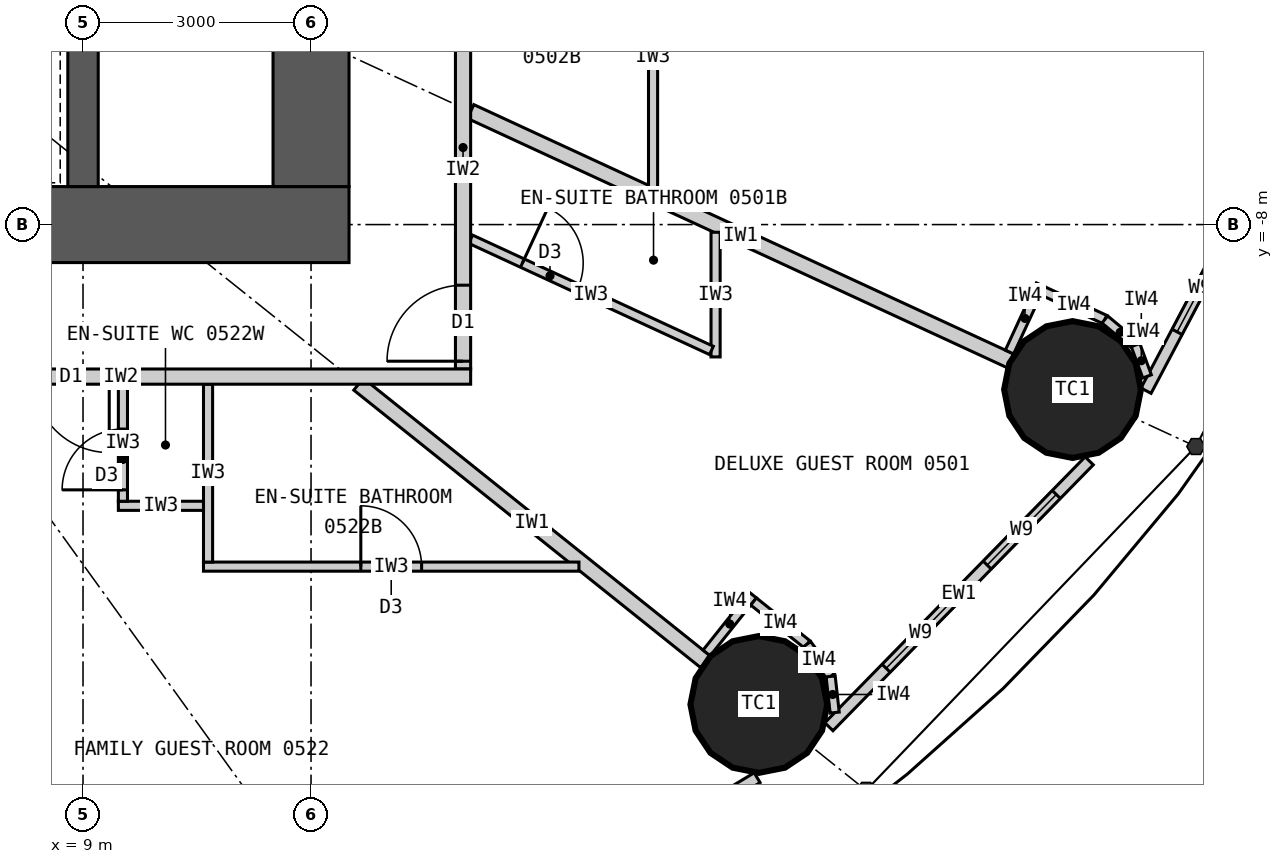
"""IFC4 building model, lengths in metres.
Left out: names, types, materials, properties, quantities, classifications, styles, units other than length and angle.
Written with IfcOpenShell. Run it as: python <this file> out.ifc"""

import sys

from ifc_helpers import new_model, si_unit, direction, frame, frame_2d, origin, origin_2d, place, context, subcontext, project, spatial, rectangle, circle, extrude, element, fill, save


model = new_model("IFC4")
c1 = context("Model", 3, precision=1e-05, world=origin(), true_north=direction((0.0, 1.0)))
c2 = subcontext(c1, "Body", "Model", "MODEL_VIEW")
j1 = project(units=[si_unit("LENGTHUNIT", "METRE"), si_unit("PLANEANGLEUNIT", "RADIAN")], contexts=[c1])
p1 = place(None, origin())
s1 = spatial("IfcSite", under=j1, at=p1, CompositionType="ELEMENT")
p2 = place(p1, origin())
s2 = spatial("IfcBuilding", under=s1, at=p2, CompositionType="ELEMENT")
p3 = place(p2, frame((0.0, 0.0, 29.4)))
s3 = spatial("IfcBuildingStorey", under=s2, at=p3, CompositionType="ELEMENT", Elevation=29.4)
for number, where, z_axis, x_axis in (
    (1, (17.892, -14.313, 0.0), (0.0, 0.0, 1.0), (1.0, 0.0, 0.0)),
    (2, (22.019, -10.17, 0.0), (0.0, 0.0, 1.0), (1.0, 0.0, 0.0)),
):
    element("IfcColumn", number, at=place(p3, frame(where, z_axis=z_axis, x_axis=x_axis)), inside=s3, PredefinedType="COLUMN", context=c2, shape_type="SweptSolid", body=[
        extrude(circle(Radius=0.9, at=origin_2d()), origin(), (0.0, 0.0, 1.0), 3.3),
    ])
p4 = place(p3, frame((12.5, -8.0, 0.0), z_axis=(0.0, 0.0, 1.0), x_axis=(-1.0, 0.0, 0.0)))
e3 = element("IfcWall", 3, at=p4, inside=s3, PredefinedType="SHEAR", context=c2, shape_type="SweptSolid", body=[
    extrude(rectangle(XDim=25.0, YDim=1.0, at=frame_2d((12.5, 0.0))), origin(), (0.0, 0.0, 1.0), 3.3),
])
p5 = place(p4, frame((11.2, 0.0, 0.0)))
e4 = element("IfcOpeningElement", 4, at=p5, cuts=e3, PredefinedType="OPENING", context=c2, shape_type="SweptSolid", body=[
    extrude(rectangle(XDim=1.2, YDim=2.2, at=frame_2d((0.6, 1.1))), frame((0.0, 0.51, 0.0), z_axis=(0.0, -1.0, 0.0), x_axis=(1.0, 0.0, 0.0)), (0.0, 0.0, 1.0), 1.02),
])
p6 = place(p4, frame((18.8, 0.0, 0.0)))
e5 = element("IfcOpeningElement", 5, at=p6, cuts=e3, PredefinedType="OPENING", context=c2, shape_type="SweptSolid", body=[
    extrude(rectangle(XDim=0.9, YDim=2.2, at=frame_2d((0.45, 1.1))), frame((0.0, 0.51, 0.0), z_axis=(0.0, -1.0, 0.0), x_axis=(1.0, 0.0, 0.0)), (0.0, 0.0, 1.0), 1.02),
])
p7 = place(p3, frame((12.0, -7.5, 0.0), z_axis=(0.0, 0.0, 1.0), x_axis=(0.0, 1.0, 0.0)))
e6 = element("IfcWall", 6, at=p7, inside=s3, PredefinedType="SHEAR", context=c2, shape_type="SweptSolid", body=[
    extrude(rectangle(XDim=15.0, YDim=1.0, at=frame_2d((7.5, 0.0))), origin(), (0.0, 0.0, 1.0), 3.3),
])
p8 = place(p7, frame((6.6, 0.0, 0.0)))
e7 = element("IfcOpeningElement", 7, at=p8, cuts=e6, PredefinedType="OPENING", context=c2, shape_type="SweptSolid", body=[
    extrude(rectangle(XDim=1.8, YDim=2.2, at=frame_2d((0.9, 1.1))), frame((0.0, 0.51, 0.0), z_axis=(0.0, -1.0, 0.0), x_axis=(1.0, 0.0, 0.0)), (0.0, 0.0, 1.0), 1.02),
])
p9 = place(p3, frame((9.0, -7.5, 0.0), z_axis=(0.0, 0.0, 1.0), x_axis=(0.0, 1.0, 0.0)))
e8 = element("IfcWall", 8, at=p9, inside=s3, PredefinedType="SHEAR", context=c2, shape_type="SweptSolid", body=[
    extrude(rectangle(XDim=3.0, YDim=0.4, at=frame_2d((1.5, 0.0))), origin(), (0.0, 0.0, 1.0), 3.3),
])
p10 = place(p3, frame((13.412, -17.957, 0.0), z_axis=(0.0, 0.0, 1.0), x_axis=(0.856958191554, 0.515385931054, 0.0)))
e9 = element("IfcWall", 9, at=p10, inside=s3, PredefinedType="ELEMENTEDWALL", context=c2, shape_type="SweptSolid", body=[
    extrude(rectangle(XDim=5.201, YDim=0.15, at=frame_2d((2.601, 0.0))), origin(), (0.0, 0.0, 1.0), 3.12),
])
p11 = place(p10, frame((1.225, 0.0, 0.9)))
e10 = element("IfcOpeningElement", 10, at=p11, cuts=e9, PredefinedType="OPENING", context=c2, shape_type="SweptSolid", body=[
    extrude(rectangle(XDim=1.3, YDim=1.9, at=frame_2d((0.65, 0.95))), frame((0.0, 0.085, 0.0), z_axis=(0.0, -1.0, 0.0), x_axis=(1.0, 0.0, 0.0)), (0.0, 0.0, 1.0), 0.17),
])
p12 = place(p10, frame((3.125, 0.0, 0.9)))
e11 = element("IfcOpeningElement", 11, at=p12, cuts=e9, PredefinedType="OPENING", context=c2, shape_type="SweptSolid", body=[
    extrude(rectangle(XDim=1.3, YDim=1.9, at=frame_2d((0.65, 0.95))), frame((0.0, 0.085, 0.0), z_axis=(0.0, -1.0, 0.0), x_axis=(1.0, 0.0, 0.0)), (0.0, 0.0, 1.0), 0.17),
])
p13 = place(p3, frame((18.813, -14.607, 0.0), z_axis=(0.0, 0.0, 1.0), x_axis=(0.699612594083, 0.714522370679, 0.0)))
e12 = element("IfcWall", 12, at=p13, inside=s3, PredefinedType="ELEMENTEDWALL", context=c2, shape_type="SweptSolid", body=[
    extrude(rectangle(XDim=4.896, YDim=0.15, at=frame_2d((2.448, 0.0))), origin(), (0.0, 0.0, 1.0), 3.12),
])
p14 = place(p13, frame((1.077, 0.0, 0.9)))
e13 = element("IfcOpeningElement", 13, at=p14, cuts=e12, PredefinedType="OPENING", context=c2, shape_type="SweptSolid", body=[
    extrude(rectangle(XDim=1.3, YDim=1.9, at=frame_2d((0.65, 0.95))), frame((0.0, 0.085, 0.0), z_axis=(0.0, -1.0, 0.0), x_axis=(1.0, 0.0, 0.0)), (0.0, 0.0, 1.0), 0.17),
])
p15 = place(p13, frame((2.977, 0.0, 0.9)))
e14 = element("IfcOpeningElement", 14, at=p15, cuts=e12, PredefinedType="OPENING", context=c2, shape_type="SweptSolid", body=[
    extrude(rectangle(XDim=1.3, YDim=1.9, at=frame_2d((0.65, 0.95))), frame((0.0, 0.085, 0.0), z_axis=(0.0, -1.0, 0.0), x_axis=(1.0, 0.0, 0.0)), (0.0, 0.0, 1.0), 0.17),
])
p16 = place(p3, frame((22.986, -10.185, 0.0), z_axis=(0.0, 0.0, 1.0), x_axis=(0.467303182954, 0.884097129959, 0.0)))
e15 = element("IfcWall", 15, at=p16, inside=s3, PredefinedType="ELEMENTEDWALL", context=c2, shape_type="SweptSolid", body=[
    extrude(rectangle(XDim=4.606, YDim=0.15, at=frame_2d((2.303, 0.0))), origin(), (0.0, 0.0, 1.0), 3.12),
])
p17 = place(p16, frame((0.875, 0.0, 0.9)))
e16 = element("IfcOpeningElement", 16, at=p17, cuts=e15, PredefinedType="OPENING", context=c2, shape_type="SweptSolid", body=[
    extrude(rectangle(XDim=1.3, YDim=1.9, at=frame_2d((0.65, 0.95))), frame((0.0, 0.085, 0.0), z_axis=(0.0, -1.0, 0.0), x_axis=(1.0, 0.0, 0.0)), (0.0, 0.0, 1.0), 0.17),
])
p18 = place(p16, frame((2.775, 0.0, 0.9)))
e17 = element("IfcOpeningElement", 17, at=p18, cuts=e15, PredefinedType="OPENING", context=c2, shape_type="SweptSolid", body=[
    extrude(rectangle(XDim=1.3, YDim=1.9, at=frame_2d((0.65, 0.95))), frame((0.0, 0.085, 0.0), z_axis=(0.0, -1.0, 0.0), x_axis=(1.0, 0.0, 0.0)), (0.0, 0.0, 1.0), 0.17),
])
p19 = place(p3, frame((5.239, -10.1, 0.0), z_axis=(0.0, 0.0, 1.0), x_axis=(0.460422783389, -0.887699758103, 0.0)))
e18 = element("IfcWall", 18, at=p19, inside=s3, PredefinedType="PARTITIONING", context=c2, shape_type="SweptSolid", body=[
    extrude(rectangle(XDim=10.12, YDim=0.2, at=frame_2d((5.06, 0.0))), origin(), (0.0, 0.0, 1.0), 3.12),
])
p20 = place(p3, frame((12.625, -10.1, 0.0), z_axis=(0.0, 0.0, 1.0), x_axis=(0.780872884676, -0.624689953479, 0.0)))
e19 = element("IfcWall", 19, at=p20, inside=s3, PredefinedType="PARTITIONING", context=c2, shape_type="SweptSolid", body=[
    extrude(rectangle(XDim=5.845, YDim=0.2, at=frame_2d((2.922, 0.0))), origin(), (0.0, 0.0, 1.0), 2.32),
])
p21 = place(p3, frame((14.1, -6.512, 0.0), z_axis=(0.0, 0.0, 1.0), x_axis=(0.907842433118, -0.41931147925, 0.0)))
e20 = element("IfcWall", 20, at=p21, inside=s3, PredefinedType="PARTITIONING", context=c2, shape_type="SweptSolid", body=[
    extrude(rectangle(XDim=7.823, YDim=0.2, at=frame_2d((3.912, 0.0))), origin(), (0.0, 0.0, 1.0), 2.32),
])
p22 = place(p3, frame((17.323, -8.101, 0.0), z_axis=(0.0, 0.0, 1.0), x_axis=(0.0, -1.0, 0.0)))
e21 = element("IfcWall", 21, at=p22, inside=s3, PredefinedType="PARTITIONING", context=c2, shape_type="SweptSolid", body=[
    extrude(rectangle(XDim=1.64, YDim=0.12, at=frame_2d((0.82, 0.0))), origin(), (0.0, 0.0, 1.0), 3.12),
])
p23 = place(p3, frame((14.1, -8.193, 0.0), z_axis=(0.0, 0.0, 1.0), x_axis=(0.907836493557, -0.419324338628, 0.0)))
e22 = element("IfcWall", 22, at=p23, inside=s3, PredefinedType="PARTITIONING", context=c2, shape_type="SweptSolid", body=[
    extrude(rectangle(XDim=3.49, YDim=0.12, at=frame_2d((1.745, 0.0))), origin(), (0.0, 0.0, 1.0), 3.12),
])
p24 = place(p23, frame((0.75, 0.0, 0.0)))
e23 = element("IfcOpeningElement", 23, at=p24, cuts=e22, PredefinedType="OPENING", context=c2, shape_type="SweptSolid", body=[
    extrude(rectangle(XDim=0.8, YDim=2.1, at=frame_2d((0.4, 1.05))), frame((0.0, 0.07, 0.0), z_axis=(0.0, -1.0, 0.0), x_axis=(1.0, 0.0, 0.0)), (0.0, 0.0, 1.0), 0.14),
])
p25 = place(p3, frame((16.5, -7.521, 0.0), z_axis=(0.0, 0.0, 1.0), x_axis=(0.0, 1.0, 0.0)))
e24 = element("IfcWall", 24, at=p25, inside=s3, PredefinedType="PARTITIONING", context=c2, shape_type="SweptSolid", body=[
    extrude(rectangle(XDim=3.448, YDim=0.12, at=frame_2d((1.724, 0.0))), origin(), (0.0, 0.0, 1.0), 3.12),
])
p26 = place(p3, frame((15.525, -12.5, 0.0), z_axis=(0.0, 0.0, 1.0), x_axis=(-1.0, 0.0, 0.0)))
e25 = element("IfcWall", 25, at=p26, inside=s3, PredefinedType="PARTITIONING", context=c2, shape_type="SweptSolid", body=[
    extrude(rectangle(XDim=4.94, YDim=0.12, at=frame_2d((2.47, 0.0))), origin(), (0.0, 0.0, 1.0), 3.12),
])
p27 = place(p26, frame((2.07, 0.0, 0.0)))
e26 = element("IfcOpeningElement", 26, at=p27, cuts=e25, PredefinedType="OPENING", context=c2, shape_type="SweptSolid", body=[
    extrude(rectangle(XDim=0.8, YDim=2.1, at=frame_2d((0.4, 1.05))), frame((0.0, 0.07, 0.0), z_axis=(0.0, -1.0, 0.0), x_axis=(1.0, 0.0, 0.0)), (0.0, 0.0, 1.0), 0.14),
])
p28 = place(p3, frame((10.645, -10.1, 0.0), z_axis=(0.0, 0.0, 1.0), x_axis=(0.0, -1.0, 0.0)))
e27 = element("IfcWall", 27, at=p28, inside=s3, PredefinedType="PARTITIONING", context=c2, shape_type="SweptSolid", body=[
    extrude(rectangle(XDim=2.34, YDim=0.12, at=frame_2d((1.17, 0.0))), origin(), (0.0, 0.0, 1.0), 3.12),
])
p29 = place(p3, frame((10.585, -11.7, 0.0), z_axis=(0.0, 0.0, 1.0), x_axis=(-1.0, 0.0, 0.0)))
e28 = element("IfcWall", 28, at=p29, inside=s3, PredefinedType="PARTITIONING", context=c2, shape_type="SweptSolid", body=[
    extrude(rectangle(XDim=1.12, YDim=0.12, at=frame_2d((0.56, 0.0))), origin(), (0.0, 0.0, 1.0), 3.12),
])
p30 = place(p3, frame((9.525, -10.1, 0.0), z_axis=(0.0, 0.0, 1.0), x_axis=(0.0, -1.0, 0.0)))
e29 = element("IfcWall", 29, at=p30, inside=s3, PredefinedType="PARTITIONING", context=c2, shape_type="SweptSolid", body=[
    extrude(rectangle(XDim=1.54, YDim=0.12, at=frame_2d((0.77, 0.0))), origin(), (0.0, 0.0, 1.0), 3.12),
])
p31 = place(p30, frame((0.59, 0.0, 0.0)))
e30 = element("IfcOpeningElement", 30, at=p31, cuts=e29, PredefinedType="OPENING", context=c2, shape_type="SweptSolid", body=[
    extrude(rectangle(XDim=0.8, YDim=2.1, at=frame_2d((0.4, 1.05))), frame((0.0, 0.07, 0.0), z_axis=(0.0, -1.0, 0.0), x_axis=(1.0, 0.0, 0.0)), (0.0, 0.0, 1.0), 0.14),
])
p32 = place(p3, frame((14.0, -9.9, 0.0), z_axis=(0.0, 0.0, 1.0), x_axis=(0.0, 1.0, 0.0)))
e31 = element("IfcWall", 31, at=p32, inside=s3, PredefinedType="PARTITIONING", context=c2, shape_type="SweptSolid", body=[
    extrude(rectangle(XDim=5.827, YDim=0.2, at=frame_2d((2.914, 0.0))), origin(), (0.0, 0.0, 1.0), 3.12),
])
p33 = place(p32, frame((0.103, 0.0, 0.0)))
e32 = element("IfcOpeningElement", 32, at=p33, cuts=e31, PredefinedType="OPENING", context=c2, shape_type="SweptSolid", body=[
    extrude(rectangle(XDim=1.0, YDim=2.2, at=frame_2d((0.5, 1.1))), frame((0.0, 0.11, 0.0), z_axis=(0.0, -1.0, 0.0), x_axis=(1.0, 0.0, 0.0)), (0.0, 0.0, 1.0), 0.22),
])
p34 = place(p3, frame((14.1, -10.0, 0.0), z_axis=(0.0, 0.0, 1.0), x_axis=(-1.0, 0.0, 0.0)))
e33 = element("IfcWall", 33, at=p34, inside=s3, PredefinedType="PARTITIONING", context=c2, shape_type="SweptSolid", body=[
    extrude(rectangle(XDim=9.205, YDim=0.2, at=frame_2d((4.603, 0.0))), origin(), (0.0, 0.0, 1.0), 3.12),
])
p35 = place(p34, frame((4.755, 0.0, 0.0)))
e34 = element("IfcOpeningElement", 34, at=p35, cuts=e33, PredefinedType="OPENING", context=c2, shape_type="SweptSolid", body=[
    extrude(rectangle(XDim=1.0, YDim=2.2, at=frame_2d((0.5, 1.1))), frame((0.0, 0.11, 0.0), z_axis=(0.0, -1.0, 0.0), x_axis=(1.0, 0.0, 0.0)), (0.0, 0.0, 1.0), 0.22),
])
p36 = place(p3, frame((17.205, -13.635, 0.0), z_axis=(0.0, 0.0, 1.0), x_axis=(0.624756144097, 0.780819928289, 0.0)))
e35 = element("IfcWall", 35, at=p36, inside=s3, PredefinedType="PARTITIONING", context=c2, shape_type="SweptSolid", body=[
    extrude(rectangle(XDim=0.975, YDim=0.12, at=frame_2d((0.487, 0.0))), origin(), (0.0, 0.0, 1.0), 3.12),
])
p37 = place(p3, frame((17.823, -12.959, 0.0), z_axis=(0.0, 0.0, 1.0), x_axis=(0.780895271023, -0.624661969144, 0.0)))
e36 = element("IfcWall", 36, at=p37, inside=s3, PredefinedType="PARTITIONING", context=c2, shape_type="SweptSolid", body=[
    extrude(rectangle(XDim=0.9, YDim=0.12, at=frame_2d((0.45, 0.0))), origin(), (0.0, 0.0, 1.0), 3.12),
])
p38 = place(p3, frame((18.526, -13.521, 0.0), z_axis=(0.0, 0.0, 1.0), x_axis=(0.592532503205, -0.805546542818, 0.0)))
e37 = element("IfcWall", 37, at=p38, inside=s3, PredefinedType="PARTITIONING", context=c2, shape_type="SweptSolid", body=[
    extrude(rectangle(XDim=0.525, YDim=0.12, at=frame_2d((0.262, 0.0))), origin(), (0.0, 0.0, 1.0), 3.12),
])
p39 = place(p3, frame((18.837, -13.944, 0.0), z_axis=(0.0, 0.0, 1.0), x_axis=(0.110543348478, -0.993871303594, 0.0)))
e38 = element("IfcWall", 38, at=p39, inside=s3, PredefinedType="PARTITIONING", context=c2, shape_type="SweptSolid", body=[
    extrude(rectangle(XDim=0.479, YDim=0.12, at=frame_2d((0.24, 0.0))), origin(), (0.0, 0.0, 1.0), 3.12),
])
p40 = place(p3, frame((21.189, -9.677, 0.0), z_axis=(0.0, 0.0, 1.0), x_axis=(0.419344098106, 0.907827366509, 0.0)))
e39 = element("IfcWall", 39, at=p40, inside=s3, PredefinedType="PARTITIONING", context=c2, shape_type="SweptSolid", body=[
    extrude(rectangle(XDim=0.975, YDim=0.12, at=frame_2d((0.487, 0.0))), origin(), (0.0, 0.0, 1.0), 3.12),
])
p41 = place(p3, frame((21.627, -8.872, 0.0), z_axis=(0.0, 0.0, 1.0), x_axis=(0.907935564339, -0.419109783957, 0.0)))
e40 = element("IfcWall", 40, at=p41, inside=s3, PredefinedType="PARTITIONING", context=c2, shape_type="SweptSolid", body=[
    extrude(rectangle(XDim=0.9, YDim=0.12, at=frame_2d((0.45, 0.0))), origin(), (0.0, 0.0, 1.0), 3.12),
])
p42 = place(p3, frame((22.445, -9.249, 0.0), z_axis=(0.0, 0.0, 1.0), x_axis=(0.768335565584, -0.640047231584, 0.0)))
e41 = element("IfcWall", 41, at=p42, inside=s3, PredefinedType="PARTITIONING", context=c2, shape_type="SweptSolid", body=[
    extrude(rectangle(XDim=0.525, YDim=0.12, at=frame_2d((0.263, 0.0))), origin(), (0.0, 0.0, 1.0), 3.12),
])
p43 = place(p3, frame((22.848, -9.585, 0.0), z_axis=(0.0, 0.0, 1.0), x_axis=(0.345267312673, -0.938504386138, 0.0)))
e42 = element("IfcWall", 42, at=p43, inside=s3, PredefinedType="PARTITIONING", context=c2, shape_type="SweptSolid", body=[
    extrude(rectangle(XDim=0.439, YDim=0.12, at=frame_2d((0.22, 0.0))), origin(), (0.0, 0.0, 1.0), 3.12),
])
p44 = place(p14, origin())
e43 = element("IfcWindow", 43, at=p44, inside=s3, PartitioningType="SINGLE_PANEL", PredefinedType="WINDOW", context=c2, shape_type="SweptSolid", body=[
    extrude(rectangle(XDim=1.3, YDim=1.9, at=frame_2d((0.65, 0.95))), frame((0.0, 0.03, 0.0), z_axis=(0.0, -1.0, 0.0), x_axis=(1.0, 0.0, 0.0)), (0.0, 0.0, 1.0), 0.06),
])
fill(e13, e43)
p45 = place(p15, origin())
e44 = element("IfcWindow", 44, at=p45, inside=s3, PartitioningType="SINGLE_PANEL", PredefinedType="WINDOW", context=c2, shape_type="SweptSolid", body=[
    extrude(rectangle(XDim=1.3, YDim=1.9, at=frame_2d((0.65, 0.95))), frame((0.0, 0.03, 0.0), z_axis=(0.0, -1.0, 0.0), x_axis=(1.0, 0.0, 0.0)), (0.0, 0.0, 1.0), 0.06),
])
fill(e14, e44)
p46 = place(p17, origin())
e45 = element("IfcWindow", 45, at=p46, inside=s3, PartitioningType="SINGLE_PANEL", PredefinedType="WINDOW", context=c2, shape_type="SweptSolid", body=[
    extrude(rectangle(XDim=1.3, YDim=1.9, at=frame_2d((0.65, 0.95))), frame((0.0, 0.03, 0.0), z_axis=(0.0, -1.0, 0.0), x_axis=(1.0, 0.0, 0.0)), (0.0, 0.0, 1.0), 0.06),
])
fill(e16, e45)
p47 = place(p24, origin())
e46 = element("IfcDoor", 46, at=p47, inside=s3, OperationType="SINGLE_SWING_LEFT", PredefinedType="DOOR", context=c2, shape_type="SweptSolid", body=[
    extrude(rectangle(XDim=0.8, YDim=2.1, at=frame_2d((0.4, 1.05))), frame((0.0, 0.025, 0.0), z_axis=(0.0, -1.0, 0.0), x_axis=(1.0, 0.0, 0.0)), (0.0, 0.0, 1.0), 0.05),
])
fill(e23, e46)
p48 = place(p33, origin())
e47 = element("IfcDoor", 47, at=p48, inside=s3, OperationType="SINGLE_SWING_LEFT", PredefinedType="DOOR", context=c2, shape_type="SweptSolid", body=[
    extrude(rectangle(XDim=1.0, YDim=2.2, at=frame_2d((0.5, 1.1))), frame((0.0, 0.025, 0.0), z_axis=(0.0, -1.0, 0.0), x_axis=(1.0, 0.0, 0.0)), (0.0, 0.0, 1.0), 0.05),
])
fill(e32, e47)
p49 = place(p27, origin())
e48 = element("IfcDoor", 48, at=p49, inside=s3, OperationType="SINGLE_SWING_RIGHT", PredefinedType="DOOR", context=c2, shape_type="SweptSolid", body=[
    extrude(rectangle(XDim=0.8, YDim=2.1, at=frame_2d((0.4, 1.05))), frame((0.0, 0.025, 0.0), z_axis=(0.0, -1.0, 0.0), x_axis=(1.0, 0.0, 0.0)), (0.0, 0.0, 1.0), 0.05),
])
fill(e26, e48)
p50 = place(p31, origin())
e49 = element("IfcDoor", 49, at=p50, inside=s3, OperationType="SINGLE_SWING_RIGHT", PredefinedType="DOOR", context=c2, shape_type="SweptSolid", body=[
    extrude(rectangle(XDim=0.8, YDim=2.1, at=frame_2d((0.4, 1.05))), frame((0.0, 0.025, 0.0), z_axis=(0.0, -1.0, 0.0), x_axis=(1.0, 0.0, 0.0)), (0.0, 0.0, 1.0), 0.05),
])
fill(e30, e49)
p51 = place(p35, origin())
e50 = element("IfcDoor", 50, at=p51, inside=s3, OperationType="SINGLE_SWING_LEFT", PredefinedType="DOOR", context=c2, shape_type="SweptSolid", body=[
    extrude(rectangle(XDim=1.0, YDim=2.2, at=frame_2d((0.5, 1.1))), frame((0.0, 0.025, 0.0), z_axis=(0.0, -1.0, 0.0), x_axis=(1.0, 0.0, 0.0)), (0.0, 0.0, 1.0), 0.05),
])
fill(e34, e50)
save(model, sys.argv[1])
